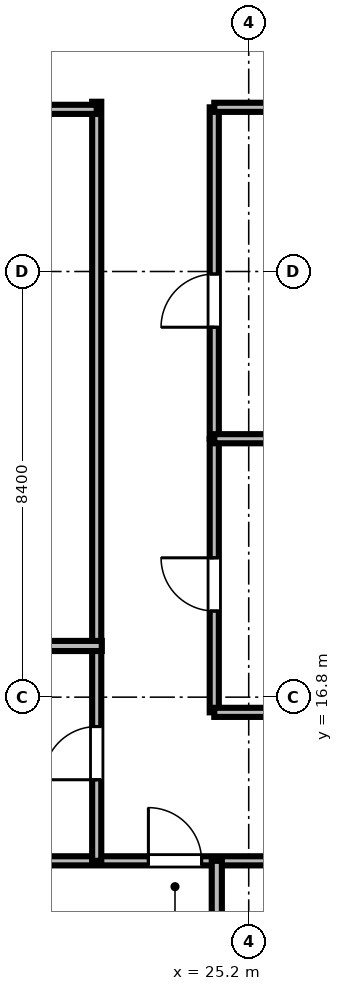
"""IFC4 building model, lengths in metres.
Left out: names, types, materials, properties, quantities, classifications, styles, units other than length and angle.
Written with IfcOpenShell. Run it as: python <this file> out.ifc"""

import sys

from ifc_helpers import new_model, si_unit, direction, frame, frame_2d, origin, place, context, subcontext, project, spatial, rectangle, extrude, source, transform, mapped, element, fill, save


model = new_model("IFC4")
c1 = context("Model", 3, precision=1e-05, world=origin(), true_north=direction((0.0, 1.0)))
c2 = subcontext(c1, "Body", "Model", "MODEL_VIEW")
j1 = project(units=[si_unit("LENGTHUNIT", "METRE"), si_unit("PLANEANGLEUNIT", "RADIAN")], contexts=[c1])
p1 = place(None, origin())
s1 = spatial("IfcSite", under=j1, at=p1, CompositionType="ELEMENT")
p2 = place(p1, origin())
s2 = spatial("IfcBuilding", under=s1, at=p2, CompositionType="ELEMENT")
p3 = place(p2, frame((0.0, 0.0, 192.3)))
s3 = spatial("IfcBuildingStorey", under=s2, at=p3, CompositionType="ELEMENT", Elevation=192.3)
m1 = source(origin(), c2, "Body", "SweptSolid", [
    extrude(rectangle(XDim=46.156, YDim=0.18, at=frame_2d((23.078, 0.0))), origin(), (0.0, 0.0, 1.0), 2.772),
])
p4 = place(p3, frame((11.422, 13.57, 0.0), z_axis=(0.0, 0.0, 1.0), x_axis=(1.0, 0.0, 0.0)))
e1 = element("IfcWall", 1, at=p4, inside=s3, PredefinedType="PARTITIONING", context=c2, shape_type="MappedRepresentation", body=[
    mapped(m1, transform((0.0, 0.0, 0.0), scale=1.0)),
])
m2 = source(origin(), c2, "Body", "SweptSolid", [
    extrude(rectangle(XDim=1.05, YDim=2.2, at=frame_2d((0.525, 1.1))), frame((0.0, 0.1, 0.0), z_axis=(0.0, -1.0, 0.0), x_axis=(1.0, 0.0, 0.0)), (0.0, 0.0, 1.0), 0.2),
])
p5 = place(p4, frame((11.798, 0.0, 0.0)))
e2 = element("IfcOpeningElement", 2, at=p5, cuts=e1, PredefinedType="OPENING", context=c2, shape_type="MappedRepresentation", body=[
    mapped(m2, transform((0.0, 0.0, 0.0), scale=1.0)),
])
p6 = place(p4, frame((16.503, 0.0, 0.0)))
e3 = element("IfcOpeningElement", 3, at=p6, cuts=e1, PredefinedType="OPENING", context=c2, shape_type="MappedRepresentation", body=[
    mapped(m2, transform((0.0, 0.0, 0.0), scale=1.0)),
])
p7 = place(p4, frame((24.253, 0.0, 0.0)))
e4 = element("IfcOpeningElement", 4, at=p7, cuts=e1, PredefinedType="OPENING", context=c2, shape_type="MappedRepresentation", body=[
    mapped(m2, transform((0.0, 0.0, 0.0), scale=1.0)),
])
p8 = place(p4, frame((32.003, 0.0, 0.0)))
e5 = element("IfcOpeningElement", 5, at=p8, cuts=e1, PredefinedType="OPENING", context=c2, shape_type="MappedRepresentation", body=[
    mapped(m2, transform((0.0, 0.0, 0.0), scale=1.0)),
])
p9 = place(p4, frame((37.498, 0.0, 0.0)))
e6 = element("IfcOpeningElement", 6, at=p9, cuts=e1, PredefinedType="OPENING", context=c2, shape_type="MappedRepresentation", body=[
    mapped(m2, transform((0.0, 0.0, 0.0), scale=1.0)),
])
m3 = source(origin(), c2, "Body", "SweptSolid", [
    extrude(rectangle(XDim=14.98, YDim=0.18, at=frame_2d((7.49, 0.0))), origin(), (0.0, 0.0, 1.0), 2.972),
])
p10 = place(p3, frame((22.2, 13.57, 0.0), z_axis=(0.0, 0.0, 1.0), x_axis=(0.0, 1.0, 0.0)))
e7 = element("IfcWall", 7, at=p10, inside=s3, PredefinedType="PARTITIONING", context=c2, shape_type="MappedRepresentation", body=[
    mapped(m3, transform((0.0, 0.0, 0.0), scale=1.0)),
])
p11 = place(p10, frame((1.6, 0.0, 0.0)))
e8 = element("IfcOpeningElement", 8, at=p11, cuts=e7, PredefinedType="OPENING", context=c2, shape_type="MappedRepresentation", body=[
    mapped(m2, transform((0.0, 0.0, 0.0), scale=1.0)),
])
m4 = source(origin(), c2, "Body", "SweptSolid", [
    extrude(rectangle(XDim=6.54, YDim=0.18, at=frame_2d((3.27, 0.0))), origin(), (0.0, 0.0, 1.0), 2.972),
])
p12 = place(p3, frame((24.52, 21.9, 0.0), z_axis=(0.0, 0.0, 1.0), x_axis=(0.0, 1.0, 0.0)))
e9 = element("IfcWall", 9, at=p12, inside=s3, PredefinedType="PARTITIONING", context=c2, shape_type="MappedRepresentation", body=[
    mapped(m4, transform((0.0, 0.0, 0.0), scale=1.0)),
])
p13 = place(p12, frame((2.2, 0.0, 0.0)))
e10 = element("IfcOpeningElement", 10, at=p13, cuts=e9, PredefinedType="OPENING", context=c2, shape_type="MappedRepresentation", body=[
    mapped(m2, transform((0.0, 0.0, 0.0), scale=1.0)),
])
m5 = source(origin(), c2, "Body", "SweptSolid", [
    extrude(rectangle(XDim=5.4, YDim=0.18, at=frame_2d((2.7, 0.0))), origin(), (0.0, 0.0, 1.0), 2.972),
])
p14 = place(p3, frame((24.52, 16.5, 0.0), z_axis=(0.0, 0.0, 1.0), x_axis=(0.0, 1.0, 0.0)))
e11 = element("IfcWall", 11, at=p14, inside=s3, PredefinedType="PARTITIONING", context=c2, shape_type="MappedRepresentation", body=[
    mapped(m5, transform((0.0, 0.0, 0.0), scale=1.0)),
])
p15 = place(p14, frame((2.0, 0.0, 0.0)))
e12 = element("IfcOpeningElement", 12, at=p15, cuts=e11, PredefinedType="OPENING", context=c2, shape_type="MappedRepresentation", body=[
    mapped(m2, transform((0.0, 0.0, 0.0), scale=1.0)),
])
m6 = source(origin(), c2, "Body", "SweptSolid", [
    extrude(rectangle(XDim=11.448, YDim=0.2, at=frame_2d((5.724, 0.0))), origin(), (0.0, 0.0, 1.0), 2.772),
])
p16 = place(p3, frame((24.57, 2.122, 0.0), z_axis=(0.0, 0.0, 1.0), x_axis=(0.0, 1.0, 0.0)))
e13 = element("IfcWall", 13, at=p16, inside=s3, PredefinedType="PARTITIONING", context=c2, shape_type="MappedRepresentation", body=[
    mapped(m6, transform((0.0, 0.0, 0.0), scale=1.0)),
])
m7 = source(origin(), c2, "Body", "SweptSolid", [
    extrude(rectangle(XDim=10.878, YDim=0.2, at=frame_2d((5.439, 0.0))), origin(), (0.0, 0.0, 1.0), 2.772),
])
p17 = place(p3, frame((11.422, 17.81, 0.0), z_axis=(0.0, 0.0, 1.0), x_axis=(1.0, 0.0, 0.0)))
e14 = element("IfcWall", 14, at=p17, inside=s3, PredefinedType="PARTITIONING", context=c2, shape_type="MappedRepresentation", body=[
    mapped(m7, transform((0.0, 0.0, 0.0), scale=1.0)),
])
m8 = source(origin(), c2, "Body", "SweptSolid", [
    extrude(rectangle(XDim=10.97, YDim=0.18, at=frame_2d((5.485, 0.0))), origin(), (0.0, 0.0, 1.0), 2.772),
])
p18 = place(p3, frame((11.23, 28.4, 0.0), z_axis=(0.0, 0.0, 1.0), x_axis=(1.0, 0.0, 0.0)))
e15 = element("IfcWall", 15, at=p18, inside=s3, PredefinedType="PARTITIONING", context=c2, shape_type="MappedRepresentation", body=[
    mapped(m8, transform((0.0, 0.0, 0.0), scale=1.0)),
])
m9 = source(origin(), c2, "Body", "SweptSolid", [
    extrude(rectangle(XDim=3.88, YDim=0.18, at=frame_2d((1.94, 0.0))), origin(), (0.0, 0.0, 1.0), 3.53),
])
for number, where, z_axis, x_axis in (
    (16, (24.52, 16.5, 0.0), (0.0, 0.0, 1.0), (1.0, 0.0, 0.0)),
    (17, (24.52, 21.9, 0.0), (0.0, 0.0, 1.0), (1.0, 0.0, 0.0)),
    (18, (24.52, 28.44, 0.0), (0.0, 0.0, 1.0), (1.0, 0.0, 0.0)),
):
    element("IfcWall", number, at=place(p3, frame(where, z_axis=z_axis, x_axis=x_axis)), inside=s3, PredefinedType="PARTITIONING", context=c2, shape_type="MappedRepresentation", body=[
        mapped(m9, transform((0.0, 0.0, 0.0), scale=1.0)),
    ])
m10 = source(origin(), c2, "Body", "SweptSolid", [
    extrude(rectangle(XDim=1.05, YDim=2.2, at=frame_2d((0.525, 1.1))), frame((0.0, 0.025, 0.0), z_axis=(0.0, -1.0, 0.0), x_axis=(1.0, 0.0, 0.0)), (0.0, 0.0, 1.0), 0.05),
])
p19 = place(p5, origin())
e19 = element("IfcDoor", 19, at=p19, inside=s3, OperationType="SINGLE_SWING_LEFT", PredefinedType="DOOR", context=c2, shape_type="MappedRepresentation", body=[
    mapped(m10, transform((0.0, 0.0, 0.0), scale=1.0)),
])
fill(e2, e19)
p20 = place(p11, origin())
e20 = element("IfcDoor", 20, at=p20, inside=s3, OperationType="SINGLE_SWING_LEFT", PredefinedType="DOOR", context=c2, shape_type="MappedRepresentation", body=[
    mapped(m10, transform((0.0, 0.0, 0.0), scale=1.0)),
])
fill(e8, e20)
p21 = place(p13, origin())
e21 = element("IfcDoor", 21, at=p21, inside=s3, OperationType="SINGLE_SWING_LEFT", PredefinedType="DOOR", context=c2, shape_type="MappedRepresentation", body=[
    mapped(m10, transform((0.0, 0.0, 0.0), scale=1.0)),
])
fill(e10, e21)
p22 = place(p15, origin())
e22 = element("IfcDoor", 22, at=p22, inside=s3, OperationType="SINGLE_SWING_RIGHT", PredefinedType="DOOR", context=c2, shape_type="MappedRepresentation", body=[
    mapped(m10, transform((0.0, 0.0, 0.0), scale=1.0)),
])
fill(e12, e22)
save(model, sys.argv[1])
